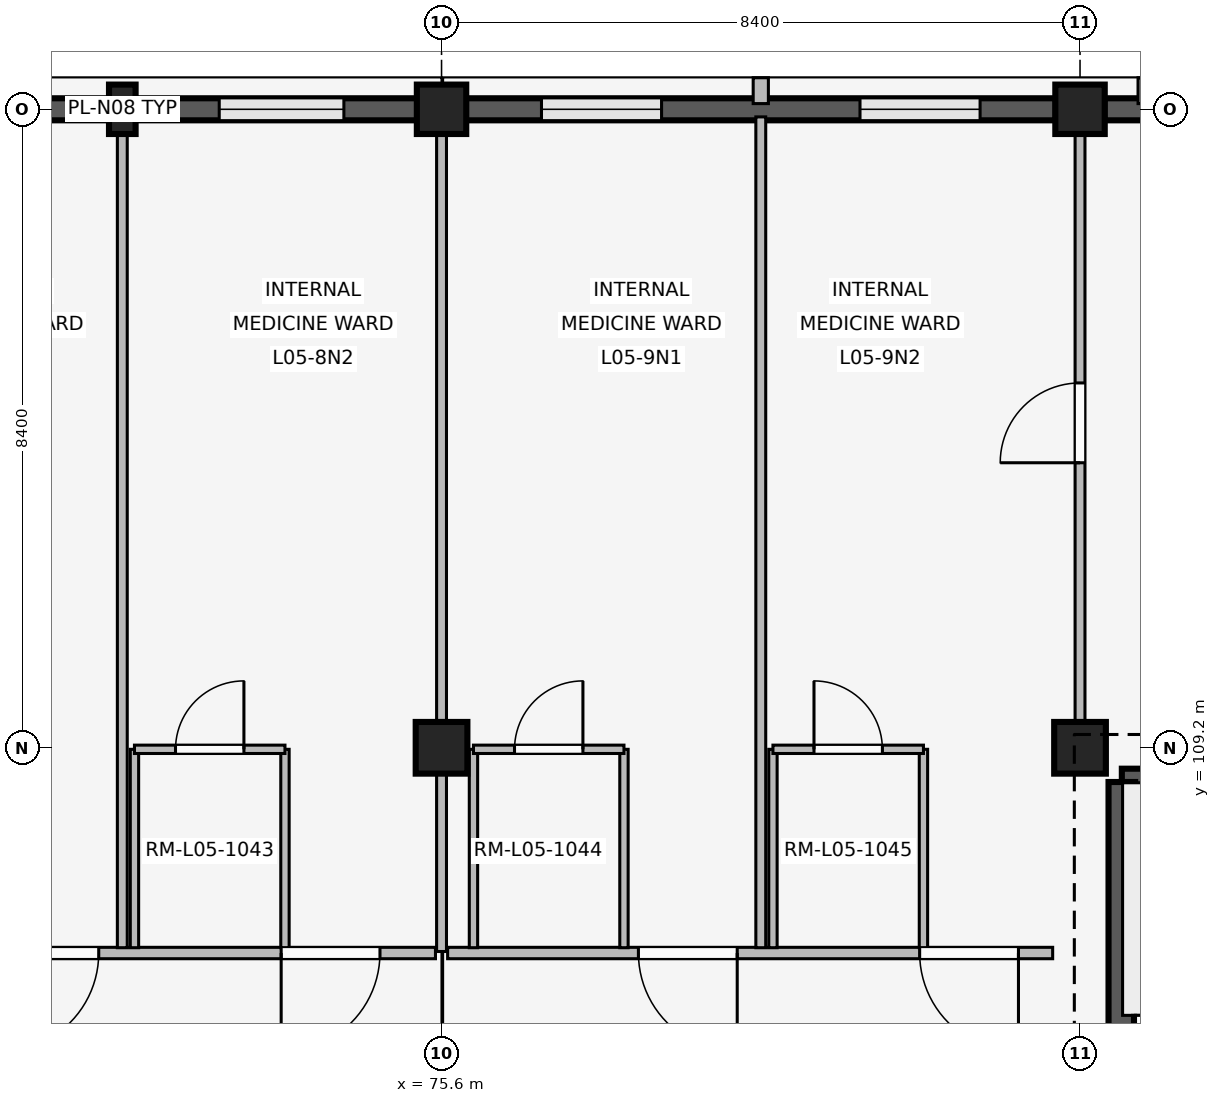
"""IFC4 building model, lengths in metres.
Left out: names, types, materials, properties, quantities, classifications, styles, units other than length and angle.
Written with IfcOpenShell. Run it as: python <this file> out.ifc"""

import sys

from ifc_helpers import new_model, si_unit, direction, frame, frame_2d, origin, origin_2d, place, context, subcontext, project, spatial, rectangle, extrude, element, fill, save


model = new_model("IFC4")
c1 = context("Model", 3, precision=1e-05, world=origin(), true_north=direction((0.0, 1.0)))
c2 = subcontext(c1, "Body", "Model", "MODEL_VIEW")
j1 = project(units=[si_unit("LENGTHUNIT", "METRE"), si_unit("PLANEANGLEUNIT", "RADIAN")], contexts=[c1])
p1 = place(None, origin())
s1 = spatial("IfcSite", under=j1, at=p1, CompositionType="ELEMENT")
p2 = place(p1, origin())
s2 = spatial("IfcBuilding", under=s1, at=p2, CompositionType="ELEMENT")
p3 = place(p2, frame((0.0, 0.0, 20.4)))
s3 = spatial("IfcBuildingStorey", under=s2, at=p3, CompositionType="ELEMENT", Elevation=20.4)
p4 = place(p3, frame((75.6, 109.2, 0.0), z_axis=(0.0, 0.0, 1.0), x_axis=(1.0, 0.0, 0.0)))
e1 = element("IfcColumn", 1, at=p4, inside=s3, PredefinedType="COLUMN", context=c2, shape_type="SweptSolid", body=[
    extrude(rectangle(XDim=0.68, YDim=0.68, at=origin_2d()), origin(), (0.0, 0.0, 1.0), 4.2),
])
p5 = place(p3, frame((75.6, 117.6, 0.0), z_axis=(0.0, 0.0, 1.0), x_axis=(1.0, 0.0, 0.0)))
e2 = element("IfcColumn", 2, at=p5, inside=s3, PredefinedType="COLUMN", context=c2, shape_type="SweptSolid", body=[
    extrude(rectangle(XDim=0.65, YDim=0.65, at=origin_2d()), origin(), (0.0, 0.0, 1.0), 4.2),
])
p6 = place(p3, frame((84.0, 109.2, 0.0), z_axis=(0.0, 0.0, 1.0), x_axis=(1.0, 0.0, 0.0)))
e3 = element("IfcColumn", 3, at=p6, inside=s3, PredefinedType="COLUMN", context=c2, shape_type="SweptSolid", body=[
    extrude(rectangle(XDim=0.68, YDim=0.68, at=origin_2d()), origin(), (0.0, 0.0, 1.0), 4.2),
])
p7 = place(p3, frame((84.0, 117.6, 0.0), z_axis=(0.0, 0.0, 1.0), x_axis=(1.0, 0.0, 0.0)))
e4 = element("IfcColumn", 4, at=p7, inside=s3, PredefinedType="COLUMN", context=c2, shape_type="SweptSolid", body=[
    extrude(rectangle(XDim=0.65, YDim=0.65, at=origin_2d()), origin(), (0.0, 0.0, 1.0), 4.2),
])
p8 = place(p3, frame((71.4, 117.6, 0.0), z_axis=(0.0, 0.0, 1.0), x_axis=(1.0, 0.0, 0.0)))
e5 = element("IfcColumn", 5, at=p8, inside=s3, PredefinedType="PILASTER", context=c2, shape_type="SweptSolid", body=[
    extrude(rectangle(XDim=0.35, YDim=0.65, at=origin_2d()), origin(), (0.0, 0.0, 1.0), 4.2),
])
p9 = place(p3, frame((67.52, 117.6, 0.0), z_axis=(0.0, 0.0, 1.0), x_axis=(1.0, 0.0, 0.0)))
e6 = element("IfcWall", 6, at=p9, inside=s3, PredefinedType="SOLIDWALL", context=c2, shape_type="SweptSolid", body=[
    extrude(rectangle(XDim=7.76, YDim=0.29, at=frame_2d((3.88, 0.0))), origin(), (0.0, 0.0, 1.0), 3.34),
])
p10 = place(p9, frame((0.965, 0.0, 0.85)))
e7 = element("IfcOpeningElement", 7, at=p10, cuts=e6, PredefinedType="OPENING", context=c2, shape_type="SweptSolid", body=[
    extrude(rectangle(XDim=1.64, YDim=1.75, at=frame_2d((0.82, 0.875))), frame((0.0, 0.155, 0.0), z_axis=(0.0, -1.0, 0.0), x_axis=(1.0, 0.0, 0.0)), (0.0, 0.0, 1.0), 0.31),
])
p11 = place(p9, frame((5.155, 0.0, 0.85)))
e8 = element("IfcOpeningElement", 8, at=p11, cuts=e6, PredefinedType="OPENING", context=c2, shape_type="SweptSolid", body=[
    extrude(rectangle(XDim=1.64, YDim=1.75, at=frame_2d((0.82, 0.875))), frame((0.0, 0.155, 0.0), z_axis=(0.0, -1.0, 0.0), x_axis=(1.0, 0.0, 0.0)), (0.0, 0.0, 1.0), 0.31),
])
p12 = place(p3, frame((75.92, 117.6, 0.0), z_axis=(0.0, 0.0, 1.0), x_axis=(1.0, 0.0, 0.0)))
e9 = element("IfcWall", 9, at=p12, inside=s3, PredefinedType="SOLIDWALL", context=c2, shape_type="SweptSolid", body=[
    extrude(rectangle(XDim=7.76, YDim=0.29, at=frame_2d((3.88, 0.0))), origin(), (0.0, 0.0, 1.0), 3.34),
])
p13 = place(p12, frame((0.995, 0.0, 0.85)))
e10 = element("IfcOpeningElement", 10, at=p13, cuts=e9, PredefinedType="OPENING", context=c2, shape_type="SweptSolid", body=[
    extrude(rectangle(XDim=1.58, YDim=1.7, at=frame_2d((0.79, 0.85))), frame((0.0, 0.155, 0.0), z_axis=(0.0, -1.0, 0.0), x_axis=(1.0, 0.0, 0.0)), (0.0, 0.0, 1.0), 0.31),
])
p14 = place(p12, frame((5.185, 0.0, 0.85)))
e11 = element("IfcOpeningElement", 11, at=p14, cuts=e9, PredefinedType="OPENING", context=c2, shape_type="SweptSolid", body=[
    extrude(rectangle(XDim=1.58, YDim=1.7, at=frame_2d((0.79, 0.85))), frame((0.0, 0.155, 0.0), z_axis=(0.0, -1.0, 0.0), x_axis=(1.0, 0.0, 0.0)), (0.0, 0.0, 1.0), 0.31),
])
p15 = place(p3, frame((79.8, 117.675, 0.0), z_axis=(0.0, 0.0, 1.0), x_axis=(0.0, 1.0, 0.0)))
e12 = element("IfcWall", 12, at=p15, inside=s3, PredefinedType="ELEMENTEDWALL", context=c2, shape_type="SweptSolid", body=[
    extrude(rectangle(XDim=0.34, YDim=0.2, at=frame_2d((0.17, 0.0))), origin(), (0.0, 0.0, 1.0), 3.32),
])
p16 = place(p3, frame((84.32, 117.6, 0.0), z_axis=(0.0, 0.0, 1.0), x_axis=(1.0, 0.0, 0.0)))
e13 = element("IfcWall", 13, at=p16, inside=s3, PredefinedType="SOLIDWALL", context=c2, shape_type="SweptSolid", body=[
    extrude(rectangle(XDim=7.76, YDim=0.29, at=frame_2d((3.88, 0.0))), origin(), (0.0, 0.0, 1.0), 3.34),
])
p17 = place(p16, frame((1.045, 0.0, 0.85)))
e14 = element("IfcOpeningElement", 14, at=p17, cuts=e13, PredefinedType="OPENING", context=c2, shape_type="SweptSolid", body=[
    extrude(rectangle(XDim=1.48, YDim=1.6, at=frame_2d((0.74, 0.8))), frame((0.0, 0.155, 0.0), z_axis=(0.0, -1.0, 0.0), x_axis=(1.0, 0.0, 0.0)), (0.0, 0.0, 1.0), 0.31),
])
p18 = place(p16, frame((5.235, 0.0, 0.85)))
e15 = element("IfcOpeningElement", 15, at=p18, cuts=e13, PredefinedType="OPENING", context=c2, shape_type="SweptSolid", body=[
    extrude(rectangle(XDim=1.48, YDim=1.6, at=frame_2d((0.74, 0.8))), frame((0.0, 0.155, 0.0), z_axis=(0.0, -1.0, 0.0), x_axis=(1.0, 0.0, 0.0)), (0.0, 0.0, 1.0), 0.31),
])
p19 = place(p3, frame((84.863, 117.675, 0.0), z_axis=(0.0, 0.0, 1.0), x_axis=(0.0, 1.0, 0.0)))
e16 = element("IfcWall", 16, at=p19, inside=s3, PredefinedType="ELEMENTEDWALL", context=c2, shape_type="SweptSolid", body=[
    extrude(rectangle(XDim=0.34, YDim=0.2, at=frame_2d((0.17, 0.0))), origin(), (0.0, 0.0, 1.0), 3.32),
])
p20 = place(p3, frame((84.55, 108.75, 0.0), z_axis=(0.0, 0.0, 1.0), x_axis=(1.0, 0.0, 0.0)))
e17 = element("IfcWall", 17, at=p20, inside=s3, PredefinedType="SHEAR", context=c2, shape_type="SweptSolid", body=[
    extrude(rectangle(XDim=7.5, YDim=0.35, at=frame_2d((3.75, 0.0))), origin(), (0.0, 0.0, 1.0), 3.92),
])
p21 = place(p3, frame((84.55, 101.2, 0.0), z_axis=(0.0, 0.0, 1.0), x_axis=(0.0, 1.0, 0.0)))
e18 = element("IfcWall", 18, at=p21, inside=s3, PredefinedType="SHEAR", context=c2, shape_type="SweptSolid", body=[
    extrude(rectangle(XDim=7.55, YDim=0.35, at=frame_2d((3.775, 0.0))), origin(), (0.0, 0.0, 1.0), 3.92),
])
p22 = place(p21, frame((0.28, 0.0, 0.0)))
e19 = element("IfcOpeningElement", 19, at=p22, cuts=e18, PredefinedType="OPENING", context=c2, shape_type="SweptSolid", body=[
    extrude(rectangle(XDim=1.0, YDim=2.15, at=frame_2d((0.5, 1.075))), frame((0.0, 0.185, 0.0), z_axis=(0.0, -1.0, 0.0), x_axis=(1.0, 0.0, 0.0)), (0.0, 0.0, 1.0), 0.37),
])
p23 = place(p3, frame((75.52, 106.5, 0.0), z_axis=(0.0, 0.0, 1.0), x_axis=(-1.0, 0.0, 0.0)))
e20 = element("IfcWall", 20, at=p23, inside=s3, PredefinedType="PARTITIONING", context=c2, shape_type="SweptSolid", body=[
    extrude(rectangle(XDim=8.24, YDim=0.15, at=frame_2d((4.12, 0.0))), origin(), (0.0, 0.0, 1.0), 3.32),
])
p24 = place(p23, frame((0.73, 0.0, 0.0)))
e21 = element("IfcOpeningElement", 21, at=p24, cuts=e20, PredefinedType="OPENING", context=c2, shape_type="SweptSolid", body=[
    extrude(rectangle(XDim=1.3, YDim=2.25, at=frame_2d((0.65, 1.125))), frame((0.0, 0.085, 0.0), z_axis=(0.0, -1.0, 0.0), x_axis=(1.0, 0.0, 0.0)), (0.0, 0.0, 1.0), 0.17),
])
p25 = place(p23, frame((4.43, 0.0, 0.0)))
e22 = element("IfcOpeningElement", 22, at=p25, cuts=e20, PredefinedType="OPENING", context=c2, shape_type="SweptSolid", body=[
    extrude(rectangle(XDim=1.3, YDim=2.25, at=frame_2d((0.65, 1.125))), frame((0.0, 0.085, 0.0), z_axis=(0.0, -1.0, 0.0), x_axis=(1.0, 0.0, 0.0)), (0.0, 0.0, 1.0), 0.17),
])
p26 = place(p3, frame((71.4, 106.57, 0.0), z_axis=(0.0, 0.0, 1.0), x_axis=(0.0, 1.0, 0.0)))
e23 = element("IfcWall", 23, at=p26, inside=s3, PredefinedType="PARTITIONING", context=c2, shape_type="SweptSolid", body=[
    extrude(rectangle(XDim=10.93, YDim=0.13, at=frame_2d((5.465, 0.0))), origin(), (0.0, 0.0, 1.0), 3.32),
])
for number, where, z_axis, x_axis in (
    (24, (71.56, 106.57, 0.0), (0.0, 0.0, 1.0), (0.0, 1.0, 0.0)),
    (25, (73.54, 106.57, 0.0), (0.0, 0.0, 1.0), (0.0, 1.0, 0.0)),
):
    element("IfcWall", number, at=place(p3, frame(where, z_axis=z_axis, x_axis=x_axis)), inside=s3, PredefinedType="PARTITIONING", context=c2, shape_type="SweptSolid", body=[
        extrude(rectangle(XDim=2.61, YDim=0.11, at=frame_2d((1.305, 0.0))), origin(), (0.0, 0.0, 1.0), 3.32),
    ])
p27 = place(p3, frame((71.56, 109.18, 0.0), z_axis=(0.0, 0.0, 1.0), x_axis=(1.0, 0.0, 0.0)))
e26 = element("IfcWall", 26, at=p27, inside=s3, PredefinedType="PARTITIONING", context=c2, shape_type="SweptSolid", body=[
    extrude(rectangle(XDim=1.98, YDim=0.11, at=frame_2d((0.99, 0.0))), origin(), (0.0, 0.0, 1.0), 3.32),
])
p28 = place(p27, frame((0.54, 0.0, 0.0)))
e27 = element("IfcOpeningElement", 27, at=p28, cuts=e26, PredefinedType="OPENING", context=c2, shape_type="SweptSolid", body=[
    extrude(rectangle(XDim=0.9, YDim=2.1, at=frame_2d((0.45, 1.05))), frame((0.0, 0.065, 0.0), z_axis=(0.0, -1.0, 0.0), x_axis=(1.0, 0.0, 0.0)), (0.0, 0.0, 1.0), 0.13),
])
p29 = place(p3, frame((75.6, 106.52, 0.0), z_axis=(0.0, 0.0, 1.0), x_axis=(0.0, 1.0, 0.0)))
e28 = element("IfcWall", 28, at=p29, inside=s3, PredefinedType="PARTITIONING", context=c2, shape_type="SweptSolid", body=[
    extrude(rectangle(XDim=10.94, YDim=0.13, at=frame_2d((5.47, 0.0))), origin(), (0.0, 0.0, 1.0), 3.32),
])
p30 = place(p3, frame((83.64, 106.5, 0.0), z_axis=(0.0, 0.0, 1.0), x_axis=(-1.0, 0.0, 0.0)))
e29 = element("IfcWall", 29, at=p30, inside=s3, PredefinedType="PARTITIONING", context=c2, shape_type="SweptSolid", body=[
    extrude(rectangle(XDim=7.96, YDim=0.15, at=frame_2d((3.98, 0.0))), origin(), (0.0, 0.0, 1.0), 3.32),
])
p31 = place(p30, frame((0.45, 0.0, 0.0)))
e30 = element("IfcOpeningElement", 30, at=p31, cuts=e29, PredefinedType="OPENING", context=c2, shape_type="SweptSolid", body=[
    extrude(rectangle(XDim=1.3, YDim=2.25, at=frame_2d((0.65, 1.125))), frame((0.0, 0.085, 0.0), z_axis=(0.0, -1.0, 0.0), x_axis=(1.0, 0.0, 0.0)), (0.0, 0.0, 1.0), 0.17),
])
p32 = place(p30, frame((4.15, 0.0, 0.0)))
e31 = element("IfcOpeningElement", 31, at=p32, cuts=e29, PredefinedType="OPENING", context=c2, shape_type="SweptSolid", body=[
    extrude(rectangle(XDim=1.3, YDim=2.25, at=frame_2d((0.65, 1.125))), frame((0.0, 0.085, 0.0), z_axis=(0.0, -1.0, 0.0), x_axis=(1.0, 0.0, 0.0)), (0.0, 0.0, 1.0), 0.17),
])
p33 = place(p3, frame((79.8, 106.57, 0.0), z_axis=(0.0, 0.0, 1.0), x_axis=(0.0, 1.0, 0.0)))
e32 = element("IfcWall", 32, at=p33, inside=s3, PredefinedType="PARTITIONING", context=c2, shape_type="SweptSolid", body=[
    extrude(rectangle(XDim=10.93, YDim=0.13, at=frame_2d((5.465, 0.0))), origin(), (0.0, 0.0, 1.0), 3.32),
])
for number, where, z_axis, x_axis in (
    (33, (76.02, 106.57, 0.0), (0.0, 0.0, 1.0), (0.0, 1.0, 0.0)),
    (34, (78.0, 106.57, 0.0), (0.0, 0.0, 1.0), (0.0, 1.0, 0.0)),
):
    element("IfcWall", number, at=place(p3, frame(where, z_axis=z_axis, x_axis=x_axis)), inside=s3, PredefinedType="PARTITIONING", context=c2, shape_type="SweptSolid", body=[
        extrude(rectangle(XDim=2.61, YDim=0.11, at=frame_2d((1.305, 0.0))), origin(), (0.0, 0.0, 1.0), 3.32),
    ])
p34 = place(p3, frame((76.02, 109.18, 0.0), z_axis=(0.0, 0.0, 1.0), x_axis=(1.0, 0.0, 0.0)))
e35 = element("IfcWall", 35, at=p34, inside=s3, PredefinedType="PARTITIONING", context=c2, shape_type="SweptSolid", body=[
    extrude(rectangle(XDim=1.98, YDim=0.11, at=frame_2d((0.99, 0.0))), origin(), (0.0, 0.0, 1.0), 3.32),
])
p35 = place(p34, frame((0.54, 0.0, 0.0)))
e36 = element("IfcOpeningElement", 36, at=p35, cuts=e35, PredefinedType="OPENING", context=c2, shape_type="SweptSolid", body=[
    extrude(rectangle(XDim=0.9, YDim=2.1, at=frame_2d((0.45, 1.05))), frame((0.0, 0.065, 0.0), z_axis=(0.0, -1.0, 0.0), x_axis=(1.0, 0.0, 0.0)), (0.0, 0.0, 1.0), 0.13),
])
for number, where, z_axis, x_axis in (
    (37, (79.96, 106.57, 0.0), (0.0, 0.0, 1.0), (0.0, 1.0, 0.0)),
    (38, (81.94, 106.57, 0.0), (0.0, 0.0, 1.0), (0.0, 1.0, 0.0)),
):
    element("IfcWall", number, at=place(p3, frame(where, z_axis=z_axis, x_axis=x_axis)), inside=s3, PredefinedType="PARTITIONING", context=c2, shape_type="SweptSolid", body=[
        extrude(rectangle(XDim=2.61, YDim=0.11, at=frame_2d((1.305, 0.0))), origin(), (0.0, 0.0, 1.0), 3.32),
    ])
p36 = place(p3, frame((79.96, 109.18, 0.0), z_axis=(0.0, 0.0, 1.0), x_axis=(1.0, 0.0, 0.0)))
e39 = element("IfcWall", 39, at=p36, inside=s3, PredefinedType="PARTITIONING", context=c2, shape_type="SweptSolid", body=[
    extrude(rectangle(XDim=1.98, YDim=0.11, at=frame_2d((0.99, 0.0))), origin(), (0.0, 0.0, 1.0), 3.32),
])
p37 = place(p36, frame((0.54, 0.0, 0.0)))
e40 = element("IfcOpeningElement", 40, at=p37, cuts=e39, PredefinedType="OPENING", context=c2, shape_type="SweptSolid", body=[
    extrude(rectangle(XDim=0.9, YDim=2.1, at=frame_2d((0.45, 1.05))), frame((0.0, 0.065, 0.0), z_axis=(0.0, -1.0, 0.0), x_axis=(1.0, 0.0, 0.0)), (0.0, 0.0, 1.0), 0.13),
])
p38 = place(p3, frame((84.0, 109.55, 0.0), z_axis=(0.0, 0.0, 1.0), x_axis=(0.0, 1.0, 0.0)))
e41 = element("IfcWall", 41, at=p38, inside=s3, PredefinedType="PARTITIONING", context=c2, shape_type="SweptSolid", body=[
    extrude(rectangle(XDim=7.91, YDim=0.13, at=frame_2d((3.955, 0.0))), origin(), (0.0, 0.0, 1.0), 3.32),
])
p39 = place(p38, frame((3.4, 0.0, 0.0)))
e42 = element("IfcOpeningElement", 42, at=p39, cuts=e41, PredefinedType="OPENING", context=c2, shape_type="SweptSolid", body=[
    extrude(rectangle(XDim=1.05, YDim=2.2, at=frame_2d((0.525, 1.1))), frame((0.0, 0.075, 0.0), z_axis=(0.0, -1.0, 0.0), x_axis=(1.0, 0.0, 0.0)), (0.0, 0.0, 1.0), 0.15),
])
p40 = place(p11, origin())
e43 = element("IfcWindow", 43, at=p40, inside=s3, PartitioningType="SINGLE_PANEL", PredefinedType="WINDOW", context=c2, shape_type="SweptSolid", body=[
    extrude(rectangle(XDim=1.64, YDim=1.75, at=frame_2d((0.82, 0.875))), frame((0.0, 0.03, 0.0), z_axis=(0.0, -1.0, 0.0), x_axis=(1.0, 0.0, 0.0)), (0.0, 0.0, 1.0), 0.06),
])
fill(e8, e43)
p41 = place(p13, origin())
e44 = element("IfcWindow", 44, at=p41, inside=s3, PartitioningType="SINGLE_PANEL", PredefinedType="WINDOW", context=c2, shape_type="SweptSolid", body=[
    extrude(rectangle(XDim=1.58, YDim=1.7, at=frame_2d((0.79, 0.85))), frame((0.0, 0.03, 0.0), z_axis=(0.0, -1.0, 0.0), x_axis=(1.0, 0.0, 0.0)), (0.0, 0.0, 1.0), 0.06),
])
fill(e10, e44)
p42 = place(p14, origin())
e45 = element("IfcWindow", 45, at=p42, inside=s3, PartitioningType="SINGLE_PANEL", PredefinedType="WINDOW", context=c2, shape_type="SweptSolid", body=[
    extrude(rectangle(XDim=1.58, YDim=1.7, at=frame_2d((0.79, 0.85))), frame((0.0, 0.03, 0.0), z_axis=(0.0, -1.0, 0.0), x_axis=(1.0, 0.0, 0.0)), (0.0, 0.0, 1.0), 0.06),
])
fill(e11, e45)
p43 = place(p24, origin())
e46 = element("IfcDoor", 46, at=p43, inside=s3, OperationType="SINGLE_SWING_RIGHT", PredefinedType="DOOR", context=c2, shape_type="SweptSolid", body=[
    extrude(rectangle(XDim=1.3, YDim=2.25, at=frame_2d((0.65, 1.125))), frame((0.0, 0.025, 0.0), z_axis=(0.0, -1.0, 0.0), x_axis=(1.0, 0.0, 0.0)), (0.0, 0.0, 1.0), 0.05),
])
fill(e21, e46)
p44 = place(p25, origin())
e47 = element("IfcDoor", 47, at=p44, inside=s3, OperationType="SINGLE_SWING_RIGHT", PredefinedType="DOOR", context=c2, shape_type="SweptSolid", body=[
    extrude(rectangle(XDim=1.3, YDim=2.25, at=frame_2d((0.65, 1.125))), frame((0.0, 0.025, 0.0), z_axis=(0.0, -1.0, 0.0), x_axis=(1.0, 0.0, 0.0)), (0.0, 0.0, 1.0), 0.05),
])
fill(e22, e47)
p45 = place(p28, origin())
e48 = element("IfcDoor", 48, at=p45, inside=s3, OperationType="SINGLE_SWING_RIGHT", PredefinedType="DOOR", context=c2, shape_type="SweptSolid", body=[
    extrude(rectangle(XDim=0.9, YDim=2.1, at=frame_2d((0.45, 1.05))), frame((0.0, 0.025, 0.0), z_axis=(0.0, -1.0, 0.0), x_axis=(1.0, 0.0, 0.0)), (0.0, 0.0, 1.0), 0.05),
])
fill(e27, e48)
p46 = place(p31, origin())
e49 = element("IfcDoor", 49, at=p46, inside=s3, OperationType="SINGLE_SWING_LEFT", PredefinedType="DOOR", context=c2, shape_type="SweptSolid", body=[
    extrude(rectangle(XDim=1.3, YDim=2.25, at=frame_2d((0.65, 1.125))), frame((0.0, 0.025, 0.0), z_axis=(0.0, -1.0, 0.0), x_axis=(1.0, 0.0, 0.0)), (0.0, 0.0, 1.0), 0.05),
])
fill(e30, e49)
p47 = place(p32, origin())
e50 = element("IfcDoor", 50, at=p47, inside=s3, OperationType="SINGLE_SWING_LEFT", PredefinedType="DOOR", context=c2, shape_type="SweptSolid", body=[
    extrude(rectangle(XDim=1.3, YDim=2.25, at=frame_2d((0.65, 1.125))), frame((0.0, 0.025, 0.0), z_axis=(0.0, -1.0, 0.0), x_axis=(1.0, 0.0, 0.0)), (0.0, 0.0, 1.0), 0.05),
])
fill(e31, e50)
p48 = place(p35, origin())
e51 = element("IfcDoor", 51, at=p48, inside=s3, OperationType="SINGLE_SWING_RIGHT", PredefinedType="DOOR", context=c2, shape_type="SweptSolid", body=[
    extrude(rectangle(XDim=0.9, YDim=2.1, at=frame_2d((0.45, 1.05))), frame((0.0, 0.025, 0.0), z_axis=(0.0, -1.0, 0.0), x_axis=(1.0, 0.0, 0.0)), (0.0, 0.0, 1.0), 0.05),
])
fill(e36, e51)
p49 = place(p37, origin())
e52 = element("IfcDoor", 52, at=p49, inside=s3, OperationType="SINGLE_SWING_LEFT", PredefinedType="DOOR", context=c2, shape_type="SweptSolid", body=[
    extrude(rectangle(XDim=0.9, YDim=2.1, at=frame_2d((0.45, 1.05))), frame((0.0, 0.025, 0.0), z_axis=(0.0, -1.0, 0.0), x_axis=(1.0, 0.0, 0.0)), (0.0, 0.0, 1.0), 0.05),
])
fill(e40, e52)
p50 = place(p39, origin())
e53 = element("IfcDoor", 53, at=p50, inside=s3, OperationType="SINGLE_SWING_LEFT", PredefinedType="DOOR", context=c2, shape_type="SweptSolid", body=[
    extrude(rectangle(XDim=1.05, YDim=2.2, at=frame_2d((0.525, 1.1))), frame((0.0, 0.025, 0.0), z_axis=(0.0, -1.0, 0.0), x_axis=(1.0, 0.0, 0.0)), (0.0, 0.0, 1.0), 0.05),
])
fill(e42, e53)
save(model, sys.argv[1])
